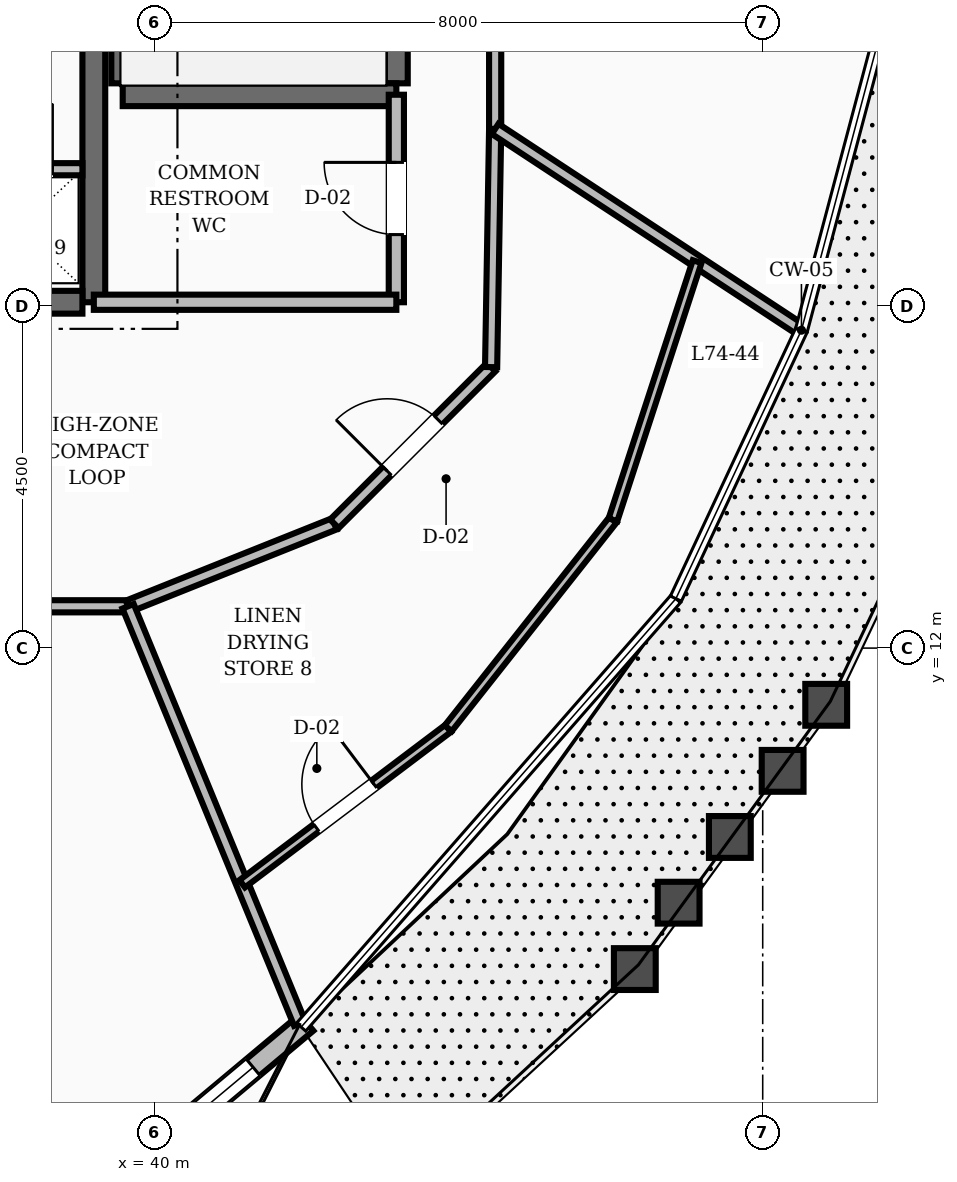
"""IFC4 building model, lengths in metres.
Left out: names, types, materials, properties, quantities, classifications, styles, units other than length and angle.
Written with IfcOpenShell. Run it as: python <this file> out.ifc"""

import sys

from ifc_helpers import new_model, si_unit, direction, frame, frame_2d, origin, place, context, subcontext, project, spatial, rectangle, extrude, element, fill, save


model = new_model("IFC4")
c1 = context("Model", 3, precision=1e-05, world=origin(), true_north=direction((0.0, 1.0)))
c2 = subcontext(c1, "Body", "Model", "MODEL_VIEW")
j1 = project(units=[si_unit("LENGTHUNIT", "METRE"), si_unit("PLANEANGLEUNIT", "RADIAN")], contexts=[c1])
p1 = place(None, origin())
s1 = spatial("IfcSite", under=j1, at=p1, CompositionType="ELEMENT")
p2 = place(p1, origin())
s2 = spatial("IfcBuilding", under=s1, at=p2, CompositionType="ELEMENT")
p3 = place(p2, frame((0.0, 0.0, 283.2)))
s3 = spatial("IfcBuildingStorey", under=s2, at=p3, CompositionType="ELEMENT", Elevation=283.2)
p4 = place(p3, frame((39.2, 16.55, 0.0), z_axis=(0.0, 0.0, 1.0), x_axis=(0.0, 1.0, 0.0)))
e1 = element("IfcWall", 1, at=p4, inside=s3, PredefinedType="SHEAR", context=c2, shape_type="SweptSolid", body=[
    extrude(rectangle(XDim=6.3, YDim=0.3, at=frame_2d((3.15, 0.0))), origin(), (0.0, 0.0, 1.0), 3.6),
])
p5 = place(p3, frame((35.8, 16.55, 0.0), z_axis=(0.0, 0.0, 1.0), x_axis=(1.0, 0.0, 0.0)))
e2 = element("IfcWall", 2, at=p5, inside=s3, PredefinedType="SHEAR", context=c2, shape_type="SweptSolid", body=[
    extrude(rectangle(XDim=3.25, YDim=0.3, at=frame_2d((1.625, 0.0))), origin(), (0.0, 0.0, 1.0), 3.6),
])
p6 = place(p5, frame((0.3, 0.0, 0.0)))
e3 = element("IfcOpeningElement", 3, at=p6, cuts=e2, PredefinedType="OPENING", context=c2, shape_type="SweptSolid", body=[
    extrude(rectangle(XDim=1.1, YDim=2.1, at=frame_2d((0.55, 1.05))), frame((0.0, 0.16, 0.0), z_axis=(0.0, -1.0, 0.0), x_axis=(1.0, 0.0, 0.0)), (0.0, 0.0, 1.0), 0.32),
])
for number, where, z_axis, x_axis in (
    (4, (43.18, 19.43, 0.0), (0.0, 0.0, 1.0), (0.0, 1.0, 0.0)),
    (5, (39.58, 19.43, 0.0), (0.0, 0.0, 1.0), (0.0, 1.0, 0.0)),
):
    element("IfcWall", number, at=place(p3, frame(where, z_axis=z_axis, x_axis=x_axis)), inside=s3, PredefinedType="SHEAR", context=c2, shape_type="SweptSolid", body=[
        extrude(rectangle(XDim=8.74, YDim=0.3, at=frame_2d((4.37, 0.0))), origin(), (0.0, 0.0, 1.0), 3.6),
    ])
p7 = place(p3, frame((39.58, 19.28, 0.0), z_axis=(0.0, 0.0, 1.0), x_axis=(1.0, 0.0, 0.0)))
e6 = element("IfcWall", 6, at=p7, inside=s3, PredefinedType="SHEAR", context=c2, shape_type="SweptSolid", body=[
    extrude(rectangle(XDim=3.6, YDim=0.3, at=frame_2d((1.8, 0.0))), origin(), (0.0, 0.0, 1.0), 3.6),
])
p8 = place(p3, frame((39.053, 4.609, 0.0), z_axis=(0.0, 0.0, 1.0), x_axis=(0.767031932992, 0.641608925882, 0.0)))
e7 = element("IfcWall", 7, at=p8, inside=s3, PredefinedType="STANDARD", context=c2, shape_type="SweptSolid", body=[
    extrude(rectangle(XDim=3.841, YDim=0.28, at=frame_2d((1.92, 0.0))), origin(), (0.0, 0.0, 1.0), 2.88),
])
p9 = place(p8, frame((0.824, 0.0, 0.8)))
e8 = element("IfcOpeningElement", 8, at=p9, cuts=e7, PredefinedType="OPENING", context=c2, shape_type="SweptSolid", body=[
    extrude(rectangle(XDim=2.1, YDim=1.65, at=frame_2d((1.05, 0.825))), frame((0.0, 0.15, 0.0), z_axis=(0.0, -1.0, 0.0), x_axis=(1.0, 0.0, 0.0)), (0.0, 0.0, 1.0), 0.3),
])
p10 = place(p3, frame((43.18, 16.55, 0.0), z_axis=(0.0, 0.0, 1.0), x_axis=(0.0, 1.0, 0.0)))
e9 = element("IfcWall", 9, at=p10, inside=s3, PredefinedType="SOLIDWALL", context=c2, shape_type="SweptSolid", body=[
    extrude(rectangle(XDim=2.73, YDim=0.2, at=frame_2d((1.365, 0.0))), origin(), (0.0, 0.0, 1.0), 2.87),
])
p11 = place(p10, frame((0.89, 0.0, 0.0)))
e10 = element("IfcOpeningElement", 10, at=p11, cuts=e9, PredefinedType="OPENING", context=c2, shape_type="SweptSolid", body=[
    extrude(rectangle(XDim=0.95, YDim=2.1, at=frame_2d((0.475, 1.05))), frame((0.0, 0.11, 0.0), z_axis=(0.0, -1.0, 0.0), x_axis=(1.0, 0.0, 0.0)), (0.0, 0.0, 1.0), 0.22),
])
p12 = place(p3, frame((39.2, 16.55, 0.0), z_axis=(0.0, 0.0, 1.0), x_axis=(1.0, 0.0, 0.0)))
e11 = element("IfcWall", 11, at=p12, inside=s3, PredefinedType="SOLIDWALL", context=c2, shape_type="SweptSolid", body=[
    extrude(rectangle(XDim=3.98, YDim=0.2, at=frame_2d((1.99, 0.0))), origin(), (0.0, 0.0, 1.0), 2.87),
])
p13 = place(p3, frame((37.4, 18.3, 0.0), z_axis=(0.0, 0.0, 1.0), x_axis=(1.0, 0.0, 0.0)))
e12 = element("IfcWall", 12, at=p13, inside=s3, PredefinedType="SOLIDWALL", context=c2, shape_type="SweptSolid", body=[
    extrude(rectangle(XDim=1.65, YDim=0.16, at=frame_2d((0.825, 0.0))), origin(), (0.0, 0.0, 1.0), 2.87),
])
p14 = place(p13, frame((0.395, 0.0, 0.0)))
e13 = element("IfcOpeningElement", 13, at=p14, cuts=e12, PredefinedType="OPENING", context=c2, shape_type="SweptSolid", body=[
    extrude(rectangle(XDim=0.86, YDim=2.1, at=frame_2d((0.43, 1.05))), frame((0.0, 0.09, 0.0), z_axis=(0.0, -1.0, 0.0), x_axis=(1.0, 0.0, 0.0)), (0.0, 0.0, 1.0), 0.18),
])
p15 = place(p3, frame((36.743, 12.55, 0.0), z_axis=(0.0, 0.0, 1.0), x_axis=(1.0, 0.0, 0.0)))
e14 = element("IfcWall", 14, at=p15, inside=s3, PredefinedType="SOLIDWALL", context=c2, shape_type="SweptSolid", body=[
    extrude(rectangle(XDim=2.908, YDim=0.16, at=frame_2d((1.454, 0.0))), origin(), (0.0, 0.0, 1.0), 2.87),
])
p16 = place(p3, frame((39.651, 12.55, 0.0), z_axis=(0.0, 0.0, 1.0), x_axis=(0.92856882165, 0.371160266542, 0.0)))
e15 = element("IfcWall", 15, at=p16, inside=s3, PredefinedType="SOLIDWALL", context=c2, shape_type="SweptSolid", body=[
    extrude(rectangle(XDim=2.923, YDim=0.16, at=frame_2d((1.461, 0.0))), origin(), (0.0, 0.0, 1.0), 2.87),
])
p17 = place(p3, frame((42.365, 13.635, 0.0), z_axis=(0.0, 0.0, 1.0), x_axis=(0.707106781187, 0.707106781187, 0.0)))
e16 = element("IfcWall", 16, at=p17, inside=s3, PredefinedType="SOLIDWALL", context=c2, shape_type="SweptSolid", body=[
    extrude(rectangle(XDim=2.916, YDim=0.16, at=frame_2d((1.458, 0.0))), origin(), (0.0, 0.0, 1.0), 2.87),
])
p18 = place(p17, frame((0.983, 0.0, 0.0)))
e17 = element("IfcOpeningElement", 17, at=p18, cuts=e16, PredefinedType="OPENING", context=c2, shape_type="SweptSolid", body=[
    extrude(rectangle(XDim=0.95, YDim=2.1, at=frame_2d((0.475, 1.05))), frame((0.0, 0.09, 0.0), z_axis=(0.0, -1.0, 0.0), x_axis=(1.0, 0.0, 0.0)), (0.0, 0.0, 1.0), 0.18),
])
p19 = place(p3, frame((44.427, 15.697, 0.0), z_axis=(0.0, 0.0, 1.0), x_axis=(0.016981035134, 0.999855811828, 0.0)))
e18 = element("IfcWall", 18, at=p19, inside=s3, PredefinedType="SOLIDWALL", context=c2, shape_type="SweptSolid", body=[
    extrude(rectangle(XDim=3.134, YDim=0.16, at=frame_2d((1.567, 0.0))), origin(), (0.0, 0.0, 1.0), 2.87),
])
p20 = place(p3, frame((44.48, 18.831, 0.0), z_axis=(0.0, 0.0, 1.0), x_axis=(0.0, 1.0, 0.0)))
e19 = element("IfcWall", 19, at=p20, inside=s3, PredefinedType="SOLIDWALL", context=c2, shape_type="SweptSolid", body=[
    extrude(rectangle(XDim=2.687, YDim=0.16, at=frame_2d((1.344, 0.0))), origin(), (0.0, 0.0, 1.0), 2.87),
])
p21 = place(p3, frame((44.48, 18.831, 0.0), z_axis=(0.0, 0.0, 1.0), x_axis=(0.835700112482, -0.549186054082, 0.0)))
e20 = element("IfcWall", 20, at=p21, inside=s3, PredefinedType="SOLIDWALL", context=c2, shape_type="SweptSolid", body=[
    extrude(rectangle(XDim=4.772, YDim=0.16, at=frame_2d((2.386, 0.0))), origin(), (0.0, 0.0, 1.0), 2.87),
])
p22 = place(p3, frame((39.651, 12.55, 0.0), z_axis=(0.0, 0.0, 1.0), x_axis=(0.380449830374, -0.924801560643, 0.0)))
e21 = element("IfcWall", 21, at=p22, inside=s3, PredefinedType="SOLIDWALL", context=c2, shape_type="SweptSolid", body=[
    extrude(rectangle(XDim=5.936, YDim=0.16, at=frame_2d((2.968, 0.0))), origin(), (0.0, 0.0, 1.0), 2.87),
])
p23 = place(p3, frame((41.152, 8.899, 0.0), z_axis=(0.0, 0.0, 1.0), x_axis=(0.79826221148, 0.602310087682, 0.0)))
e22 = element("IfcWall", 22, at=p23, inside=s3, PredefinedType="PARTITIONING", context=c2, shape_type="SweptSolid", body=[
    extrude(rectangle(XDim=3.395, YDim=0.12, at=frame_2d((1.698, 0.0))), origin(), (0.0, 0.0, 1.0), 2.87),
])
p24 = place(p23, frame((1.222, 0.0, 0.0)))
e23 = element("IfcOpeningElement", 23, at=p24, cuts=e22, PredefinedType="OPENING", context=c2, shape_type="SweptSolid", body=[
    extrude(rectangle(XDim=0.95, YDim=2.1, at=frame_2d((0.475, 1.05))), frame((0.0, 0.07, 0.0), z_axis=(0.0, -1.0, 0.0), x_axis=(1.0, 0.0, 0.0)), (0.0, 0.0, 1.0), 0.14),
])
p25 = place(p3, frame((43.863, 10.944, 0.0), z_axis=(0.0, 0.0, 1.0), x_axis=(0.619897815211, 0.784682546446, 0.0)))
e24 = element("IfcWall", 24, at=p25, inside=s3, PredefinedType="PARTITIONING", context=c2, shape_type="SweptSolid", body=[
    extrude(rectangle(XDim=3.497, YDim=0.12, at=frame_2d((1.748, 0.0))), origin(), (0.0, 0.0, 1.0), 2.87),
])
p26 = place(p3, frame((46.03, 13.688, 0.0), z_axis=(0.0, 0.0, 1.0), x_axis=(0.309946735565, 0.950753922481, 0.0)))
e25 = element("IfcWall", 25, at=p26, inside=s3, PredefinedType="PARTITIONING", context=c2, shape_type="SweptSolid", body=[
    extrude(rectangle(XDim=3.572, YDim=0.12, at=frame_2d((1.786, 0.0))), origin(), (0.0, 0.0, 1.0), 2.87),
])
p27 = place(p9, origin())
e26 = element("IfcWindow", 26, at=p27, inside=s3, PartitioningType="SINGLE_PANEL", PredefinedType="WINDOW", context=c2, shape_type="SweptSolid", body=[
    extrude(rectangle(XDim=2.1, YDim=1.65, at=frame_2d((1.05, 0.825))), frame((0.0, 0.03, 0.0), z_axis=(0.0, -1.0, 0.0), x_axis=(1.0, 0.0, 0.0)), (0.0, 0.0, 1.0), 0.06),
])
fill(e8, e26)
p28 = place(p11, origin())
e27 = element("IfcDoor", 27, at=p28, inside=s3, OperationType="SINGLE_SWING_RIGHT", PredefinedType="DOOR", context=c2, shape_type="SweptSolid", body=[
    extrude(rectangle(XDim=0.95, YDim=2.1, at=frame_2d((0.475, 1.05))), frame((0.0, 0.025, 0.0), z_axis=(0.0, -1.0, 0.0), x_axis=(1.0, 0.0, 0.0)), (0.0, 0.0, 1.0), 0.05),
])
fill(e10, e27)
p29 = place(p14, origin())
e28 = element("IfcDoor", 28, at=p29, inside=s3, OperationType="SINGLE_SWING_RIGHT", PredefinedType="TRAPDOOR", context=c2, shape_type="SweptSolid", body=[
    extrude(rectangle(XDim=0.86, YDim=2.1, at=frame_2d((0.43, 1.05))), frame((0.0, 0.025, 0.0), z_axis=(0.0, -1.0, 0.0), x_axis=(1.0, 0.0, 0.0)), (0.0, 0.0, 1.0), 0.05),
])
fill(e13, e28)
p30 = place(p18, origin())
e29 = element("IfcDoor", 29, at=p30, inside=s3, OperationType="SINGLE_SWING_LEFT", PredefinedType="DOOR", context=c2, shape_type="SweptSolid", body=[
    extrude(rectangle(XDim=0.95, YDim=2.1, at=frame_2d((0.475, 1.05))), frame((0.0, 0.025, 0.0), z_axis=(0.0, -1.0, 0.0), x_axis=(1.0, 0.0, 0.0)), (0.0, 0.0, 1.0), 0.05),
])
fill(e17, e29)
p31 = place(p24, origin())
e30 = element("IfcDoor", 30, at=p31, inside=s3, OperationType="SINGLE_SWING_RIGHT", PredefinedType="DOOR", context=c2, shape_type="SweptSolid", body=[
    extrude(rectangle(XDim=0.95, YDim=2.1, at=frame_2d((0.475, 1.05))), frame((0.0, 0.025, 0.0), z_axis=(0.0, -1.0, 0.0), x_axis=(1.0, 0.0, 0.0)), (0.0, 0.0, 1.0), 0.05),
])
fill(e23, e30)
save(model, sys.argv[1])
